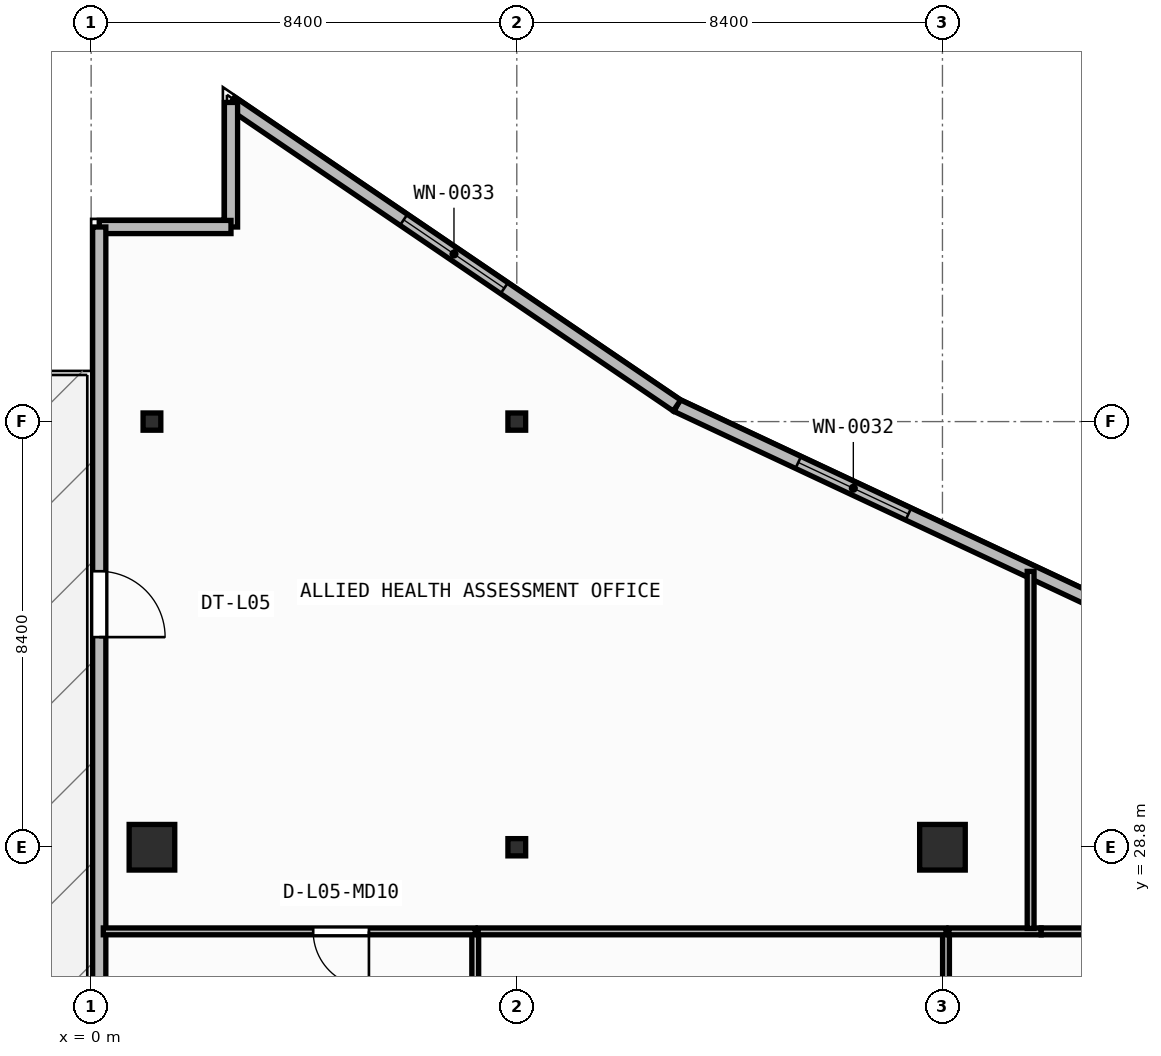
"""IFC4 building model, lengths in metres.
Left out: names, types, materials, properties, quantities, classifications, styles, units other than length and angle.
Written with IfcOpenShell. Run it as: python <this file> out.ifc"""

import sys

from ifc_helpers import new_model, si_unit, direction, frame, frame_2d, origin, origin_2d, place, context, subcontext, project, spatial, rectangle, i_section, extrude, element, fill, save


model = new_model("IFC4")
c1 = context("Model", 3, precision=1e-05, world=origin(), true_north=direction((0.0, 1.0)))
c2 = subcontext(c1, "Body", "Model", "MODEL_VIEW")
j1 = project(units=[si_unit("LENGTHUNIT", "METRE"), si_unit("PLANEANGLEUNIT", "RADIAN")], contexts=[c1])
p1 = place(None, origin())
s1 = spatial("IfcSite", under=j1, at=p1, CompositionType="ELEMENT")
p2 = place(p1, origin())
s2 = spatial("IfcBuilding", under=s1, at=p2, CompositionType="ELEMENT")
p3 = place(p2, frame((0.0, 0.0, 22.5)))
s3 = spatial("IfcBuildingStorey", under=s2, at=p3, CompositionType="ELEMENT", Elevation=22.5)
p4 = place(p3, frame((1.2, 28.8, 0.0), z_axis=(0.0, 0.0, 1.0), x_axis=(1.0, 0.0, 0.0)))
e1 = element("IfcColumn", 1, at=p4, inside=s3, PredefinedType="COLUMN", context=c2, shape_type="SweptSolid", body=[
    extrude(rectangle(XDim=0.9, YDim=0.9, at=origin_2d()), origin(), (0.0, 0.0, 1.0), 3.95),
])
p5 = place(p3, frame((8.4, 28.8, 0.0), z_axis=(0.0, 0.0, 1.0), x_axis=(1.0, 0.0, 0.0)))
e2 = element("IfcColumn", 2, at=p5, inside=s3, PredefinedType="COLUMN", context=c2, shape_type="SweptSolid", body=[
    extrude(i_section(OverallWidth=0.35, OverallDepth=0.34, WebThickness=0.016, FlangeThickness=0.028, at=origin_2d()), origin(), (0.0, 0.0, 1.0), 3.95),
])
p6 = place(p3, frame((16.8, 28.8, 0.0), z_axis=(0.0, 0.0, 1.0), x_axis=(1.0, 0.0, 0.0)))
e3 = element("IfcColumn", 3, at=p6, inside=s3, PredefinedType="COLUMN", context=c2, shape_type="SweptSolid", body=[
    extrude(rectangle(XDim=0.9, YDim=0.9, at=origin_2d()), origin(), (0.0, 0.0, 1.0), 3.95),
])
for number, where, z_axis, x_axis in (
    (4, (1.2, 37.2, 0.0), (0.0, 0.0, 1.0), (1.0, 0.0, 0.0)),
    (5, (8.4, 37.2, 0.0), (0.0, 0.0, 1.0), (1.0, 0.0, 0.0)),
):
    element("IfcColumn", number, at=place(p3, frame(where, z_axis=z_axis, x_axis=x_axis)), inside=s3, PredefinedType="COLUMN", context=c2, shape_type="SweptSolid", body=[
        extrude(i_section(OverallWidth=0.35, OverallDepth=0.34, WebThickness=0.016, FlangeThickness=0.028, at=origin_2d()), origin(), (0.0, 0.0, 1.0), 3.95),
    ])
p7 = place(p3, frame((24.408, 31.492, 0.0), z_axis=(0.0, 0.0, 1.0), x_axis=(-0.905396522918, 0.424566998585, 0.0)))
e6 = element("IfcWall", 6, at=p7, inside=s3, PredefinedType="STANDARD", context=c2, shape_type="SweptSolid", body=[
    extrude(rectangle(XDim=14.189, YDim=0.26, at=frame_2d((7.095, 0.0))), origin(), (0.0, 0.0, 1.0), 3.71),
])
p8 = place(p7, frame((9.145, 0.0, 0.9)))
e7 = element("IfcOpeningElement", 7, at=p8, cuts=e6, PredefinedType="OPENING", context=c2, shape_type="SweptSolid", body=[
    extrude(rectangle(XDim=2.4, YDim=1.65, at=frame_2d((1.2, 0.825))), frame((0.0, 0.14, 0.0), z_axis=(0.0, -1.0, 0.0), x_axis=(1.0, 0.0, 0.0)), (0.0, 0.0, 1.0), 0.28),
])
p9 = place(p3, frame((11.561, 37.517, 0.0), z_axis=(0.0, 0.0, 1.0), x_axis=(-0.827064743936, 0.562106670782, 0.0)))
e8 = element("IfcWall", 8, at=p9, inside=s3, PredefinedType="STANDARD", context=c2, shape_type="SweptSolid", body=[
    extrude(rectangle(XDim=10.641, YDim=0.26, at=frame_2d((5.32, 0.0))), origin(), (0.0, 0.0, 1.0), 3.71),
])
p10 = place(p9, frame((4.12, 0.0, 0.9)))
e9 = element("IfcOpeningElement", 9, at=p10, cuts=e8, PredefinedType="OPENING", context=c2, shape_type="SweptSolid", body=[
    extrude(rectangle(XDim=2.4, YDim=1.65, at=frame_2d((1.2, 0.825))), frame((0.0, 0.14, 0.0), z_axis=(0.0, -1.0, 0.0), x_axis=(1.0, 0.0, 0.0)), (0.0, 0.0, 1.0), 0.28),
])
p11 = place(p3, frame((2.76, 43.498, 0.0), z_axis=(0.0, 0.0, 1.0), x_axis=(0.0, -1.0, 0.0)))
e10 = element("IfcWall", 10, at=p11, inside=s3, PredefinedType="STANDARD", context=c2, shape_type="SweptSolid", body=[
    extrude(rectangle(XDim=2.458, YDim=0.26, at=frame_2d((1.229, 0.0))), origin(), (0.0, 0.0, 1.0), 3.71),
])
p12 = place(p3, frame((2.76, 41.04, 0.0), z_axis=(0.0, 0.0, 1.0), x_axis=(-1.0, 0.0, 0.0)))
e11 = element("IfcWall", 11, at=p12, inside=s3, PredefinedType="STANDARD", context=c2, shape_type="SweptSolid", body=[
    extrude(rectangle(XDim=2.6, YDim=0.26, at=frame_2d((1.3, 0.0))), origin(), (0.0, 0.0, 1.0), 3.71),
])
p13 = place(p3, frame((0.16, 41.04, 0.0), z_axis=(0.0, 0.0, 1.0), x_axis=(0.0, -1.0, 0.0)))
e12 = element("IfcWall", 12, at=p13, inside=s3, PredefinedType="STANDARD", context=c2, shape_type="SweptSolid", body=[
    extrude(rectangle(XDim=38.28, YDim=0.26, at=frame_2d((19.14, 0.0))), origin(), (0.0, 0.0, 1.0), 3.71),
])
p14 = place(p13, frame((6.793, 0.0, 0.0)))
e13 = element("IfcOpeningElement", 13, at=p14, cuts=e12, PredefinedType="OPENING", context=c2, shape_type="SweptSolid", body=[
    extrude(rectangle(XDim=1.3, YDim=2.15, at=frame_2d((0.65, 1.075))), frame((0.0, 0.14, 0.0), z_axis=(0.0, -1.0, 0.0), x_axis=(1.0, 0.0, 0.0)), (0.0, 0.0, 1.0), 0.28),
])
p15 = place(p3, frame((7.58, 20.698, 0.0), z_axis=(0.0, 0.0, 1.0), x_axis=(0.0, 1.0, 0.0)))
e14 = element("IfcWall", 14, at=p15, inside=s3, PredefinedType="PARTITIONING", context=c2, shape_type="SweptSolid", body=[
    extrude(rectangle(XDim=6.442, YDim=0.135, at=frame_2d((3.221, 0.0))), origin(), (0.0, 0.0, 1.0), 3.71),
])
p16 = place(p3, frame((7.58, 27.14, 0.0), z_axis=(0.0, 0.0, 1.0), x_axis=(-1.0, 0.0, 0.0)))
e15 = element("IfcWall", 15, at=p16, inside=s3, PredefinedType="PARTITIONING", context=c2, shape_type="SweptSolid", body=[
    extrude(rectangle(XDim=7.34, YDim=0.135, at=frame_2d((3.67, 0.0))), origin(), (0.0, 0.0, 1.0), 3.71),
])
p17 = place(p16, frame((2.098, 0.0, 0.0)))
e16 = element("IfcOpeningElement", 16, at=p17, cuts=e15, PredefinedType="OPENING", context=c2, shape_type="SweptSolid", body=[
    extrude(rectangle(XDim=1.1, YDim=2.1, at=frame_2d((0.55, 1.05))), frame((0.0, 0.077, 0.0), z_axis=(0.0, -1.0, 0.0), x_axis=(1.0, 0.0, 0.0)), (0.0, 0.0, 1.0), 0.155),
])
p18 = place(p3, frame((16.87, 19.95, 0.0), z_axis=(0.0, 0.0, 1.0), x_axis=(0.0, 1.0, 0.0)))
e17 = element("IfcWall", 17, at=p18, inside=s3, PredefinedType="PARTITIONING", context=c2, shape_type="SweptSolid", body=[
    extrude(rectangle(XDim=7.19, YDim=0.135, at=frame_2d((3.595, 0.0))), origin(), (0.0, 0.0, 1.0), 3.073),
])
p19 = place(p3, frame((16.87, 27.14, 0.0), z_axis=(0.0, 0.0, 1.0), x_axis=(-1.0, 0.0, 0.0)))
e18 = element("IfcWall", 18, at=p19, inside=s3, PredefinedType="PARTITIONING", context=c2, shape_type="SweptSolid", body=[
    extrude(rectangle(XDim=9.233, YDim=0.135, at=frame_2d((4.616, 0.0))), origin(), (0.0, 0.0, 1.0), 3.71),
])
p20 = place(p3, frame((18.748, 27.14, 0.0), z_axis=(0.0, 0.0, 1.0), x_axis=(-1.0, 0.0, 0.0)))
e19 = element("IfcWall", 19, at=p20, inside=s3, PredefinedType="PARTITIONING", context=c2, shape_type="SweptSolid", body=[
    extrude(rectangle(XDim=1.82, YDim=0.135, at=frame_2d((0.91, 0.0))), origin(), (0.0, 0.0, 1.0), 3.71),
])
p21 = place(p3, frame((36.32, 27.14, 0.0), z_axis=(0.0, 0.0, 1.0), x_axis=(-1.0, 0.0, 0.0)))
e20 = element("IfcWall", 20, at=p21, inside=s3, PredefinedType="PARTITIONING", context=c2, shape_type="SweptSolid", body=[
    extrude(rectangle(XDim=17.571, YDim=0.135, at=frame_2d((8.785, 0.0))), origin(), (0.0, 0.0, 1.0), 3.71),
])
p22 = place(p21, frame((14.663, 0.0, 0.0)))
e21 = element("IfcOpeningElement", 21, at=p22, cuts=e20, PredefinedType="OPENING", context=c2, shape_type="SweptSolid", body=[
    extrude(rectangle(XDim=1.1, YDim=2.1, at=frame_2d((0.55, 1.05))), frame((0.0, 0.077, 0.0), z_axis=(0.0, -1.0, 0.0), x_axis=(1.0, 0.0, 0.0)), (0.0, 0.0, 1.0), 0.155),
])
p23 = place(p3, frame((18.54, 27.198, 0.0), z_axis=(0.0, 0.0, 1.0), x_axis=(0.0, 1.0, 0.0)))
e22 = element("IfcWall", 22, at=p23, inside=s3, PredefinedType="PARTITIONING", context=c2, shape_type="SweptSolid", body=[
    extrude(rectangle(XDim=7.046, YDim=0.135, at=frame_2d((3.523, 0.0))), origin(), (0.0, 0.0, 1.0), 3.71),
])
p24 = place(p8, origin())
e23 = element("IfcWindow", 23, at=p24, inside=s3, PartitioningType="SINGLE_PANEL", PredefinedType="WINDOW", context=c2, shape_type="SweptSolid", body=[
    extrude(rectangle(XDim=2.4, YDim=1.65, at=frame_2d((1.2, 0.825))), frame((0.0, 0.03, 0.0), z_axis=(0.0, -1.0, 0.0), x_axis=(1.0, 0.0, 0.0)), (0.0, 0.0, 1.0), 0.06),
])
fill(e7, e23)
p25 = place(p10, origin())
e24 = element("IfcWindow", 24, at=p25, inside=s3, PartitioningType="SINGLE_PANEL", PredefinedType="WINDOW", context=c2, shape_type="SweptSolid", body=[
    extrude(rectangle(XDim=2.4, YDim=1.65, at=frame_2d((1.2, 0.825))), frame((0.0, 0.03, 0.0), z_axis=(0.0, -1.0, 0.0), x_axis=(1.0, 0.0, 0.0)), (0.0, 0.0, 1.0), 0.06),
])
fill(e9, e24)
p26 = place(p14, origin())
e25 = element("IfcDoor", 25, at=p26, inside=s3, OperationType="SINGLE_SWING_RIGHT", PredefinedType="DOOR", context=c2, shape_type="SweptSolid", body=[
    extrude(rectangle(XDim=1.3, YDim=2.15, at=frame_2d((0.65, 1.075))), frame((0.0, 0.025, 0.0), z_axis=(0.0, -1.0, 0.0), x_axis=(1.0, 0.0, 0.0)), (0.0, 0.0, 1.0), 0.05),
])
fill(e13, e25)
p27 = place(p17, origin())
e26 = element("IfcDoor", 26, at=p27, inside=s3, OperationType="SINGLE_SWING_LEFT", PredefinedType="DOOR", context=c2, shape_type="SweptSolid", body=[
    extrude(rectangle(XDim=1.1, YDim=2.1, at=frame_2d((0.55, 1.05))), frame((0.0, 0.025, 0.0), z_axis=(0.0, -1.0, 0.0), x_axis=(1.0, 0.0, 0.0)), (0.0, 0.0, 1.0), 0.05),
])
fill(e16, e26)
save(model, sys.argv[1])
